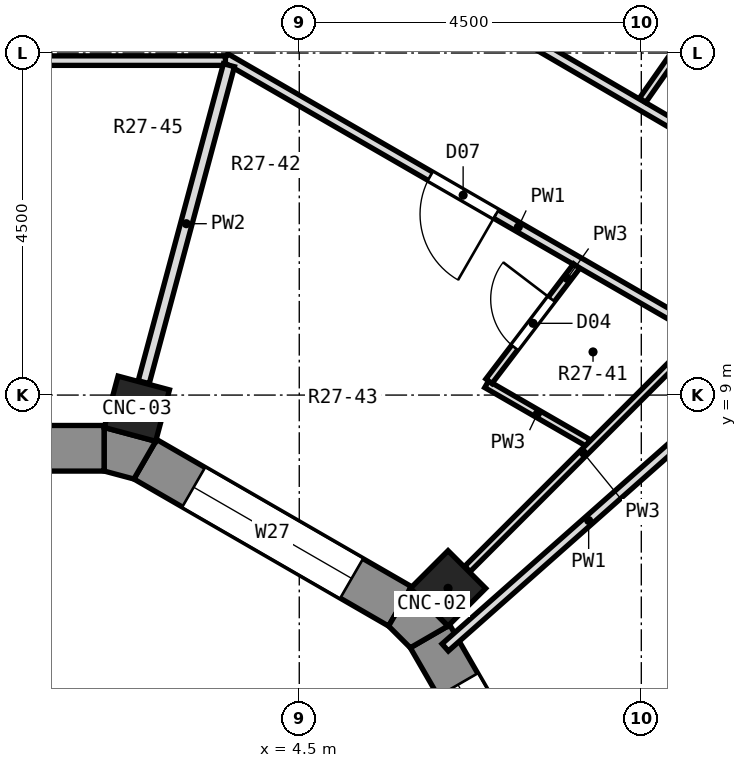
"""IFC4 building model, lengths in metres.
Left out: names, types, materials, properties, quantities, classifications, styles, units other than length and angle.
Written with IfcOpenShell. Run it as: python <this file> out.ifc"""

import sys

from ifc_helpers import new_model, si_unit, direction, frame, frame_2d, origin, origin_2d, place, context, subcontext, project, spatial, polyline, rectangle, outline, extrude, element, fill, save


model = new_model("IFC4")
c1 = context("Model", 3, precision=1e-05, world=origin(), true_north=direction((0.0, 1.0)))
c2 = subcontext(c1, "Body", "Model", "MODEL_VIEW")
j1 = project(units=[si_unit("LENGTHUNIT", "METRE"), si_unit("PLANEANGLEUNIT", "RADIAN")], contexts=[c1])
p1 = place(None, origin())
s1 = spatial("IfcSite", under=j1, at=p1, CompositionType="ELEMENT")
p2 = place(p1, origin())
s2 = spatial("IfcBuilding", under=s1, at=p2, CompositionType="ELEMENT")
p3 = place(p2, frame((0.0, 0.0, 180.6)))
s3 = spatial("IfcBuildingStorey", under=s2, at=p3, CompositionType="ELEMENT", Elevation=180.6)
for number, where, z_axis, x_axis in (
    (1, (6.458, 6.458, 0.0), (0.0, 0.0, 1.0), (0.707, 0.707, 0.0)),
    (2, (2.364, 8.821, 0.0), (0.0, 0.0, 1.0), (0.259, 0.966, 0.0)),
):
    element("IfcColumn", number, at=place(p3, frame(where, z_axis=z_axis, x_axis=x_axis)), inside=s3, PredefinedType="COLUMN", context=c2, shape_type="SweptSolid", body=[
        extrude(rectangle(XDim=0.7, YDim=0.7, at=origin_2d()), origin(), (0.0, 0.0, 1.0), 3.3),
    ])
p4 = place(p3, frame((8.156, 2.474, 0.0), z_axis=(0.0, 0.0, 1.0), x_axis=(-0.500033728941, 0.866005929495, 0.0)))
e3 = element("IfcWall", 3, at=p4, inside=s3, PredefinedType="SOLIDWALL", context=c2, shape_type="SweptSolid", body=[
    extrude(rectangle(XDim=3.87, YDim=0.6, at=frame_2d((1.935, 0.0))), origin(), (0.0, 0.0, 1.0), 2.85),
])
p5 = place(p4, frame((0.735, 0.0, 0.9)))
e4 = element("IfcOpeningElement", 4, at=p5, cuts=e3, PredefinedType="OPENING", context=c2, shape_type="SweptSolid", body=[
    extrude(rectangle(XDim=2.4, YDim=1.8, at=frame_2d((1.2, 0.9))), frame((0.0, 0.312, 0.0), z_axis=(0.0, -1.0, 0.0), x_axis=(1.0, 0.0, 0.0)), (0.0, 0.0, 1.0), 0.624),
])
p6 = place(p3, frame((5.826, 6.22, 0.0), z_axis=(0.0, 0.0, 1.0), x_axis=(-0.866005929495, 0.500033728941, 0.0)))
e5 = element("IfcWall", 5, at=p6, inside=s3, PredefinedType="SOLIDWALL", context=c2, shape_type="SweptSolid", body=[
    extrude(rectangle(XDim=3.87, YDim=0.6, at=frame_2d((1.935, 0.0))), origin(), (0.0, 0.0, 1.0), 2.85),
])
p7 = place(p6, frame((0.735, 0.0, 0.9)))
e6 = element("IfcOpeningElement", 6, at=p7, cuts=e5, PredefinedType="OPENING", context=c2, shape_type="SweptSolid", body=[
    extrude(rectangle(XDim=2.4, YDim=1.8, at=frame_2d((1.2, 0.9))), frame((0.0, 0.312, 0.0), z_axis=(0.0, -1.0, 0.0), x_axis=(1.0, 0.0, 0.0)), (0.0, 0.0, 1.0), 0.624),
])
p8 = place(p3, frame((1.935, 8.3, 0.0), z_axis=(0.0, 0.0, 1.0), x_axis=(-1.0, 0.0, 0.0)))
e7 = element("IfcWall", 7, at=p8, inside=s3, PredefinedType="SOLIDWALL", context=c2, shape_type="SweptSolid", body=[
    extrude(rectangle(XDim=3.87, YDim=0.6, at=frame_2d((1.935, 0.0))), origin(), (0.0, 0.0, 1.0), 2.85),
])
p9 = place(p8, frame((0.735, 0.0, 0.9)))
e8 = element("IfcOpeningElement", 8, at=p9, cuts=e7, PredefinedType="OPENING", context=c2, shape_type="SweptSolid", body=[
    extrude(rectangle(XDim=2.4, YDim=1.8, at=frame_2d((1.2, 0.9))), frame((0.0, 0.312, 0.0), z_axis=(0.0, -1.0, 0.0), x_axis=(1.0, 0.0, 0.0)), (0.0, 0.0, 1.0), 0.624),
])
p10 = place(p3, origin())
e9 = element("IfcWall", 9, at=p10, inside=s3, PredefinedType="SOLIDWALL", context=c2, shape_type="SweptSolid", body=[
    extrude(outline(polyline([(5.962, 6.458), (5.676, 5.961), (5.961, 5.676), (6.458, 5.962), (5.962, 6.458)])), origin(), (0.0, 0.0, 1.0), 2.85),
])
p11 = place(p3, origin())
e10 = element("IfcWall", 10, at=p11, inside=s3, PredefinedType="SOLIDWALL", context=c2, shape_type="SweptSolid", body=[
    extrude(outline(polyline([(1.935, 8.573), (1.935, 8.0), (2.324, 7.896), (2.611, 8.392), (1.935, 8.573)])), origin(), (0.0, 0.0, 1.0), 2.85),
])
p12 = place(p3, frame((7.343, 13.774, 0.0), z_axis=(0.0, 0.0, 1.0), x_axis=(0.86377127644, -0.503884095796, 0.0)))
e11 = element("IfcWall", 11, at=p12, inside=s3, PredefinedType="PARTITIONING", context=c2, shape_type="SweptSolid", body=[
    extrude(rectangle(XDim=4.646, YDim=0.125, at=frame_2d((2.323, 0.0))), origin(), (0.0, 0.0, 1.0), 2.85),
])
p13 = place(p3, frame((6.965, 9.142, 0.0), z_axis=(0.0, 0.0, 1.0), x_axis=(0.865956409518, -0.500119482538, 0.0)))
e12 = element("IfcWall", 12, at=p13, inside=s3, PredefinedType="PARTITIONING", context=c2, shape_type="SweptSolid", body=[
    extrude(rectangle(XDim=1.543, YDim=0.1, at=frame_2d((0.772, 0.0))), origin(), (0.0, 0.0, 1.0), 2.85),
])
p14 = place(p3, frame((3.529, 13.436, 0.0), z_axis=(0.0, 0.0, 1.0), x_axis=(0.865968995572, -0.500097689165, 0.0)))
e13 = element("IfcWall", 13, at=p14, inside=s3, PredefinedType="PARTITIONING", context=c2, shape_type="SweptSolid", body=[
    extrude(rectangle(XDim=7.19, YDim=0.125, at=frame_2d((3.595, 0.0))), origin(), (0.0, 0.0, 1.0), 2.85),
])
p15 = place(p14, frame((3.112, 0.0, 0.0)))
e14 = element("IfcOpeningElement", 14, at=p15, cuts=e13, PredefinedType="OPENING", context=c2, shape_type="SweptSolid", body=[
    extrude(rectangle(XDim=1.0, YDim=2.1, at=frame_2d((0.5, 1.05))), frame((0.0, 0.074, 0.0), z_axis=(0.0, -1.0, 0.0), x_axis=(1.0, 0.0, 0.0)), (0.0, 0.0, 1.0), 0.149),
])
p16 = place(p3, frame((-3.516, 13.4, 0.0), z_axis=(0.0, 0.0, 1.0), x_axis=(1.0, 0.0, 0.0)))
e15 = element("IfcWall", 15, at=p16, inside=s3, PredefinedType="PARTITIONING", context=c2, shape_type="SweptSolid", body=[
    extrude(rectangle(XDim=7.045, YDim=0.125, at=frame_2d((3.522, 0.0))), origin(), (0.0, 0.0, 1.0), 2.85),
])
p17 = place(p16, frame((3.067, 0.0, 0.0)))
e16 = element("IfcOpeningElement", 16, at=p17, cuts=e15, PredefinedType="OPENING", context=c2, shape_type="SweptSolid", body=[
    extrude(rectangle(XDim=1.0, YDim=2.1, at=frame_2d((0.5, 1.05))), frame((0.0, 0.074, 0.0), z_axis=(0.0, -1.0, 0.0), x_axis=(1.0, 0.0, 0.0)), (0.0, 0.0, 1.0), 0.149),
])
p18 = place(p3, frame((6.42, 5.68, 0.0), z_axis=(0.0, 0.0, 1.0), x_axis=(0.74896790207, 0.662606279527, 0.0)))
e17 = element("IfcWall", 17, at=p18, inside=s3, PredefinedType="PARTITIONING", context=c2, shape_type="SweptSolid", body=[
    extrude(rectangle(XDim=5.041, YDim=0.125, at=frame_2d((2.52, 0.0))), origin(), (0.0, 0.0, 1.0), 2.85),
])
p19 = place(p3, frame((6.712, 6.712, 0.0), z_axis=(0.0, 0.0, 1.0), x_axis=(0.707106781187, 0.707106781187, 0.0)))
e18 = element("IfcWall", 18, at=p19, inside=s3, PredefinedType="PARTITIONING", context=c2, shape_type="SweptSolid", body=[
    extrude(rectangle(XDim=4.318, YDim=0.1, at=frame_2d((2.159, 0.0))), origin(), (0.0, 0.0, 1.0), 2.85),
])
p20 = place(p3, frame((6.995, 9.182, 0.0), z_axis=(0.0, 0.0, 1.0), x_axis=(0.606016164932, 0.795452329081, 0.0)))
e19 = element("IfcWall", 19, at=p20, inside=s3, PredefinedType="PARTITIONING", context=c2, shape_type="SweptSolid", body=[
    extrude(rectangle(XDim=1.904, YDim=0.1, at=frame_2d((0.952, 0.0))), origin(), (0.0, 0.0, 1.0), 2.85),
])
p21 = place(p20, frame((0.558, 0.0, 0.0)))
e20 = element("IfcOpeningElement", 20, at=p21, cuts=e19, PredefinedType="OPENING", context=c2, shape_type="SweptSolid", body=[
    extrude(rectangle(XDim=0.8, YDim=2.1, at=frame_2d((0.4, 1.05))), frame((0.0, 0.062, 0.0), z_axis=(0.0, -1.0, 0.0), x_axis=(1.0, 0.0, 0.0)), (0.0, 0.0, 1.0), 0.124),
])
p22 = place(p3, frame((9.018, 12.879, 0.0), z_axis=(0.0, 0.0, 1.0), x_axis=(0.573717150032, 0.819053497495, 0.0)))
e21 = element("IfcWall", 21, at=p22, inside=s3, PredefinedType="PARTITIONING", context=c2, shape_type="SweptSolid", body=[
    extrude(rectangle(XDim=1.993, YDim=0.1, at=frame_2d((0.997, 0.0))), origin(), (0.0, 0.0, 1.0), 2.85),
])
p23 = place(p3, frame((2.454, 9.17, 0.0), z_axis=(0.0, 0.0, 1.0), x_axis=(0.259632812034, 0.965707410614, 0.0)))
e22 = element("IfcWall", 22, at=p23, inside=s3, PredefinedType="PARTITIONING", context=c2, shape_type="SweptSolid", body=[
    extrude(rectangle(XDim=4.318, YDim=0.15, at=frame_2d((2.159, 0.0))), origin(), (0.0, 0.0, 1.0), 2.85),
])
p24 = place(p5, origin())
e23 = element("IfcWindow", 23, at=p24, inside=s3, PartitioningType="SINGLE_PANEL", PredefinedType="WINDOW", context=c2, shape_type="SweptSolid", body=[
    extrude(rectangle(XDim=2.4, YDim=1.8, at=frame_2d((1.2, 0.9))), frame((0.0, -0.12, 0.0), z_axis=(0.0, -1.0, 0.0), x_axis=(1.0, 0.0, 0.0)), (0.0, 0.0, 1.0), 0.06),
])
fill(e4, e23)
p25 = place(p7, origin())
e24 = element("IfcWindow", 24, at=p25, inside=s3, PartitioningType="SINGLE_PANEL", PredefinedType="WINDOW", context=c2, shape_type="SweptSolid", body=[
    extrude(rectangle(XDim=2.4, YDim=1.8, at=frame_2d((1.2, 0.9))), frame((0.0, -0.12, 0.0), z_axis=(0.0, -1.0, 0.0), x_axis=(1.0, 0.0, 0.0)), (0.0, 0.0, 1.0), 0.06),
])
fill(e6, e24)
p26 = place(p21, origin())
e25 = element("IfcDoor", 25, at=p26, inside=s3, OperationType="SINGLE_SWING_RIGHT", PredefinedType="DOOR", context=c2, shape_type="SweptSolid", body=[
    extrude(rectangle(XDim=0.8, YDim=2.1, at=frame_2d((0.4, 1.05))), frame((0.0, 0.025, 0.0), z_axis=(0.0, -1.0, 0.0), x_axis=(1.0, 0.0, 0.0)), (0.0, 0.0, 1.0), 0.05),
])
fill(e20, e25)
p27 = place(p15, frame((1.0, 0.0, 0.0), z_axis=(0.0, 0.0, 1.0), x_axis=(-1.0, 0.0, 0.0)))
e26 = element("IfcDoor", 26, at=p27, inside=s3, OperationType="SINGLE_SWING_LEFT", PredefinedType="DOOR", context=c2, shape_type="SweptSolid", body=[
    extrude(rectangle(XDim=1.0, YDim=2.1, at=frame_2d((0.5, 1.05))), frame((0.0, 0.025, 0.0), z_axis=(0.0, -1.0, 0.0), x_axis=(1.0, 0.0, 0.0)), (0.0, 0.0, 1.0), 0.05),
])
fill(e14, e26)
save(model, sys.argv[1])
